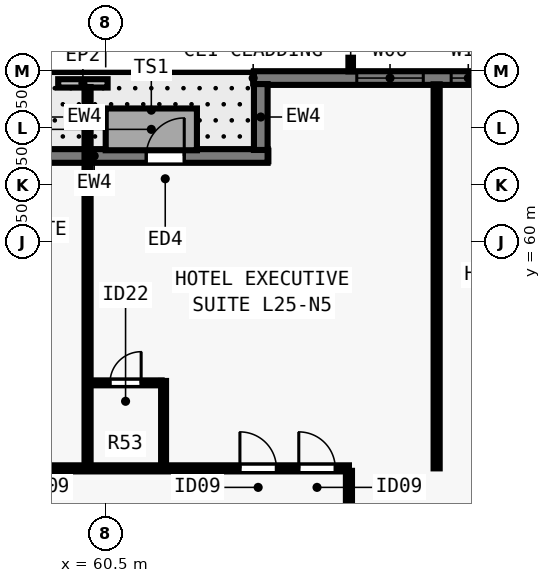
"""IFC4 building model, lengths in metres.
Left out: names, types, materials, properties, quantities, classifications, styles, units other than length and angle.
Written with IfcOpenShell. Run it as: python <this file> out.ifc"""

import sys

from ifc_helpers import new_model, si_unit, direction, frame, frame_2d, origin, place, context, subcontext, project, spatial, rectangle, extrude, element, fill, save


model = new_model("IFC4")
c1 = context("Model", 3, precision=1e-05, world=origin(), true_north=direction((0.0, 1.0)))
c2 = subcontext(c1, "Body", "Model", "MODEL_VIEW")
j1 = project(units=[si_unit("LENGTHUNIT", "METRE"), si_unit("PLANEANGLEUNIT", "RADIAN")], contexts=[c1])
p1 = place(None, origin())
s1 = spatial("IfcSite", under=j1, at=p1, CompositionType="ELEMENT")
p2 = place(p1, origin())
s2 = spatial("IfcBuilding", under=s1, at=p2, CompositionType="ELEMENT")
p3 = place(p2, frame((0.0, 0.0, 93.5)))
s3 = spatial("IfcBuildingStorey", under=s2, at=p3, CompositionType="ELEMENT", Elevation=93.5)
p4 = place(p3, frame((64.4, 64.32, 0.0), z_axis=(0.0, 0.0, 1.0), x_axis=(1.0, 0.0, 0.0)))
e1 = element("IfcWall", 1, at=p4, inside=s3, PredefinedType="SOLIDWALL", context=c2, shape_type="SweptSolid", body=[
    extrude(rectangle(XDim=9.762, YDim=0.36, at=frame_2d((4.881, 0.0))), origin(), (0.0, 0.0, 1.0), 3.24),
])
p5 = place(p4, frame((2.706, 0.0, 0.8)))
e2 = element("IfcOpeningElement", 2, at=p5, cuts=e1, PredefinedType="OPENING", context=c2, shape_type="SweptSolid", body=[
    extrude(rectangle(XDim=1.75, YDim=1.504, at=frame_2d((0.875, 0.752))), frame((0.0, 0.19, 0.0), z_axis=(0.0, -1.0, 0.0), x_axis=(1.0, 0.0, 0.0)), (0.0, 0.0, 1.0), 0.38),
])
p6 = place(p4, frame((5.19, 0.0, 0.8)))
e3 = element("IfcOpeningElement", 3, at=p6, cuts=e1, PredefinedType="OPENING", context=c2, shape_type="SweptSolid", body=[
    extrude(rectangle(XDim=0.9, YDim=1.504, at=frame_2d((0.45, 0.752))), frame((0.0, 0.19, 0.0), z_axis=(0.0, -1.0, 0.0), x_axis=(1.0, 0.0, 0.0)), (0.0, 0.0, 1.0), 0.38),
])
p7 = place(p3, frame((58.978, 62.27, 0.0), z_axis=(0.0, 0.0, 1.0), x_axis=(1.0, 0.0, 0.0)))
e4 = element("IfcWall", 4, at=p7, inside=s3, PredefinedType="SOLIDWALL", context=c2, shape_type="SweptSolid", body=[
    extrude(rectangle(XDim=5.782, YDim=0.36, at=frame_2d((2.891, 0.0))), origin(), (0.0, 0.0, 1.0), 3.24),
])
p8 = place(p7, frame((2.588, 0.0, 0.0)))
e5 = element("IfcOpeningElement", 5, at=p8, cuts=e4, PredefinedType="OPENING", context=c2, shape_type="SweptSolid", body=[
    extrude(rectangle(XDim=1.0, YDim=2.15, at=frame_2d((0.5, 1.075))), frame((0.0, 0.19, 0.0), z_axis=(0.0, -1.0, 0.0), x_axis=(1.0, 0.0, 0.0)), (0.0, 0.0, 1.0), 0.38),
])
p9 = place(p3, frame((64.58, 62.428, 0.0), z_axis=(0.0, 0.0, 1.0), x_axis=(0.0, 1.0, 0.0)))
e6 = element("IfcWall", 6, at=p9, inside=s3, PredefinedType="SOLIDWALL", context=c2, shape_type="SweptSolid", body=[
    extrude(rectangle(XDim=1.734, YDim=0.36, at=frame_2d((0.867, 0.0))), origin(), (0.0, 0.0, 1.0), 3.24),
])
p10 = place(p3, frame((59.25, 64.18, 0.0), z_axis=(0.0, 0.0, 1.0), x_axis=(1.0, 0.0, 0.0)))
e7 = element("IfcWall", 7, at=p10, inside=s3, PredefinedType="PARAPET", context=c2, shape_type="SweptSolid", body=[
    extrude(rectangle(XDim=1.3, YDim=0.22, at=frame_2d((0.65, 0.0))), origin(), (0.0, 0.0, 1.0), 0.55),
])
p11 = place(p3, frame((37.1, 54.05, 0.0), z_axis=(0.0, 0.0, 1.0), x_axis=(1.0, 0.0, 0.0)))
e8 = element("IfcWall", 8, at=p11, inside=s3, PredefinedType="PARTITIONING", context=c2, shape_type="SweptSolid", body=[
    extrude(rectangle(XDim=29.8, YDim=0.16, at=frame_2d((14.9, 0.0))), origin(), (0.0, 0.0, 1.0), 3.24),
])
p12 = place(p11, frame((0.91, 0.0, 0.0)))
e9 = element("IfcOpeningElement", 9, at=p12, cuts=e8, PredefinedType="OPENING", context=c2, shape_type="SweptSolid", body=[
    extrude(rectangle(XDim=0.96, YDim=2.15, at=frame_2d((0.48, 1.075))), frame((0.0, 0.09, 0.0), z_axis=(0.0, -1.0, 0.0), x_axis=(1.0, 0.0, 0.0)), (0.0, 0.0, 1.0), 0.18),
])
p13 = place(p11, frame((3.03, 0.0, 0.0)))
e10 = element("IfcOpeningElement", 10, at=p13, cuts=e8, PredefinedType="OPENING", context=c2, shape_type="SweptSolid", body=[
    extrude(rectangle(XDim=0.96, YDim=2.15, at=frame_2d((0.48, 1.075))), frame((0.0, 0.09, 0.0), z_axis=(0.0, -1.0, 0.0), x_axis=(1.0, 0.0, 0.0)), (0.0, 0.0, 1.0), 0.18),
])
p14 = place(p11, frame((11.39, 0.0, 0.0)))
e11 = element("IfcOpeningElement", 11, at=p14, cuts=e8, PredefinedType="OPENING", context=c2, shape_type="SweptSolid", body=[
    extrude(rectangle(XDim=0.96, YDim=2.15, at=frame_2d((0.48, 1.075))), frame((0.0, 0.09, 0.0), z_axis=(0.0, -1.0, 0.0), x_axis=(1.0, 0.0, 0.0)), (0.0, 0.0, 1.0), 0.18),
])
p15 = place(p11, frame((19.75, 0.0, 0.0)))
e12 = element("IfcOpeningElement", 12, at=p15, cuts=e8, PredefinedType="OPENING", context=c2, shape_type="SweptSolid", body=[
    extrude(rectangle(XDim=0.96, YDim=2.15, at=frame_2d((0.48, 1.075))), frame((0.0, 0.09, 0.0), z_axis=(0.0, -1.0, 0.0), x_axis=(1.0, 0.0, 0.0)), (0.0, 0.0, 1.0), 0.18),
])
p16 = place(p11, frame((26.931, 0.0, 0.0)))
e13 = element("IfcOpeningElement", 13, at=p16, cuts=e8, PredefinedType="OPENING", context=c2, shape_type="SweptSolid", body=[
    extrude(rectangle(XDim=0.96, YDim=2.15, at=frame_2d((0.48, 1.075))), frame((0.0, 0.09, 0.0), z_axis=(0.0, -1.0, 0.0), x_axis=(1.0, 0.0, 0.0)), (0.0, 0.0, 1.0), 0.18),
])
p17 = place(p11, frame((28.48, 0.0, 0.0)))
e14 = element("IfcOpeningElement", 14, at=p17, cuts=e8, PredefinedType="OPENING", context=c2, shape_type="SweptSolid", body=[
    extrude(rectangle(XDim=0.96, YDim=2.15, at=frame_2d((0.48, 1.075))), frame((0.0, 0.09, 0.0), z_axis=(0.0, -1.0, 0.0), x_axis=(1.0, 0.0, 0.0)), (0.0, 0.0, 1.0), 0.18),
])
p18 = place(p3, frame((66.9, 24.015, 0.0), z_axis=(0.0, 0.0, 1.0), x_axis=(0.0, 1.0, 0.0)))
e15 = element("IfcWall", 15, at=p18, inside=s3, PredefinedType="PARTITIONING", context=c2, shape_type="SweptSolid", body=[
    extrude(rectangle(XDim=29.97, YDim=0.16, at=frame_2d((14.985, 0.0))), origin(), (0.0, 0.0, 1.0), 3.24),
])
p19 = place(p18, frame((3.911, 0.0, 0.0)))
e16 = element("IfcOpeningElement", 16, at=p19, cuts=e15, PredefinedType="OPENING", context=c2, shape_type="SweptSolid", body=[
    extrude(rectangle(XDim=0.96, YDim=2.15, at=frame_2d((0.48, 1.075))), frame((0.0, 0.09, 0.0), z_axis=(0.0, -1.0, 0.0), x_axis=(1.0, 0.0, 0.0)), (0.0, 0.0, 1.0), 0.18),
])
p20 = place(p18, frame((9.544, 0.0, 0.0)))
e17 = element("IfcOpeningElement", 17, at=p20, cuts=e15, PredefinedType="OPENING", context=c2, shape_type="SweptSolid", body=[
    extrude(rectangle(XDim=0.96, YDim=2.15, at=frame_2d((0.48, 1.075))), frame((0.0, 0.09, 0.0), z_axis=(0.0, -1.0, 0.0), x_axis=(1.0, 0.0, 0.0)), (0.0, 0.0, 1.0), 0.18),
])
p21 = place(p18, frame((15.625, 0.0, 0.0)))
e18 = element("IfcOpeningElement", 18, at=p21, cuts=e15, PredefinedType="OPENING", context=c2, shape_type="SweptSolid", body=[
    extrude(rectangle(XDim=0.96, YDim=2.15, at=frame_2d((0.48, 1.075))), frame((0.0, 0.09, 0.0), z_axis=(0.0, -1.0, 0.0), x_axis=(1.0, 0.0, 0.0)), (0.0, 0.0, 1.0), 0.18),
])
p22 = place(p18, frame((21.584, 0.0, 0.0)))
e19 = element("IfcOpeningElement", 19, at=p22, cuts=e15, PredefinedType="OPENING", context=c2, shape_type="SweptSolid", body=[
    extrude(rectangle(XDim=0.96, YDim=2.15, at=frame_2d((0.48, 1.075))), frame((0.0, 0.09, 0.0), z_axis=(0.0, -1.0, 0.0), x_axis=(1.0, 0.0, 0.0)), (0.0, 0.0, 1.0), 0.18),
])
p23 = place(p18, frame((27.494, 0.0, 0.0)))
e20 = element("IfcOpeningElement", 20, at=p23, cuts=e15, PredefinedType="OPENING", context=c2, shape_type="SweptSolid", body=[
    extrude(rectangle(XDim=0.96, YDim=2.15, at=frame_2d((0.48, 1.075))), frame((0.0, 0.09, 0.0), z_axis=(0.0, -1.0, 0.0), x_axis=(1.0, 0.0, 0.0)), (0.0, 0.0, 1.0), 0.18),
])
p24 = place(p3, frame((60.022, 54.115, 0.0), z_axis=(0.0, 0.0, 1.0), x_axis=(0.0, 1.0, 0.0)))
e21 = element("IfcWall", 21, at=p24, inside=s3, PredefinedType="PARTITIONING", context=c2, shape_type="SweptSolid", body=[
    extrude(rectangle(XDim=9.97, YDim=0.16, at=frame_2d((4.985, 0.0))), origin(), (0.0, 0.0, 1.0), 3.24),
])
p25 = place(p3, frame((62.022, 54.115, 0.0), z_axis=(0.0, 0.0, 1.0), x_axis=(0.0, 1.0, 0.0)))
e22 = element("IfcWall", 22, at=p25, inside=s3, PredefinedType="PLUMBINGWALL", context=c2, shape_type="SweptSolid", body=[
    extrude(rectangle(XDim=2.235, YDim=0.13, at=frame_2d((1.118, 0.0))), origin(), (0.0, 0.0, 1.0), 3.24),
])
p26 = place(p3, frame((60.087, 56.3, 0.0), z_axis=(0.0, 0.0, 1.0), x_axis=(1.0, 0.0, 0.0)))
e23 = element("IfcWall", 23, at=p26, inside=s3, PredefinedType="PLUMBINGWALL", context=c2, shape_type="SweptSolid", body=[
    extrude(rectangle(XDim=1.885, YDim=0.13, at=frame_2d((0.942, 0.0))), origin(), (0.0, 0.0, 1.0), 3.24),
])
p27 = place(p26, frame((0.525, 0.0, 0.0)))
e24 = element("IfcOpeningElement", 24, at=p27, cuts=e23, PredefinedType="OPENING", context=c2, shape_type="SweptSolid", body=[
    extrude(rectangle(XDim=0.82, YDim=2.1, at=frame_2d((0.41, 1.05))), frame((0.0, 0.075, 0.0), z_axis=(0.0, -1.0, 0.0), x_axis=(1.0, 0.0, 0.0)), (0.0, 0.0, 1.0), 0.15),
])
p28 = place(p3, frame((69.208, 54.05, 0.0), z_axis=(0.0, 0.0, 1.0), x_axis=(0.0, 1.0, 0.0)))
e25 = element("IfcWall", 25, at=p28, inside=s3, PredefinedType="PARTITIONING", context=c2, shape_type="SweptSolid", body=[
    extrude(rectangle(XDim=10.105, YDim=0.16, at=frame_2d((5.052, 0.0))), origin(), (0.0, 0.0, 1.0), 2.399),
])
p29 = place(p5, origin())
e26 = element("IfcWindow", 26, at=p29, inside=s3, PartitioningType="SINGLE_PANEL", PredefinedType="WINDOW", context=c2, shape_type="SweptSolid", body=[
    extrude(rectangle(XDim=1.75, YDim=1.504, at=frame_2d((0.875, 0.752))), frame((0.0, -0.05, 0.0), z_axis=(0.0, -1.0, 0.0), x_axis=(1.0, 0.0, 0.0)), (0.0, 0.0, 1.0), 0.06),
])
fill(e2, e26)
p30 = place(p8, origin())
e27 = element("IfcDoor", 27, at=p30, inside=s3, OperationType="SINGLE_SWING_RIGHT", PredefinedType="DOOR", context=c2, shape_type="SweptSolid", body=[
    extrude(rectangle(XDim=1.0, YDim=2.15, at=frame_2d((0.5, 1.075))), frame((0.0, 0.025, 0.0), z_axis=(0.0, -1.0, 0.0), x_axis=(1.0, 0.0, 0.0)), (0.0, 0.0, 1.0), 0.05),
])
fill(e5, e27)
p31 = place(p6, origin())
e28 = element("IfcWindow", 28, at=p31, inside=s3, PartitioningType="SINGLE_PANEL", PredefinedType="WINDOW", context=c2, shape_type="SweptSolid", body=[
    extrude(rectangle(XDim=0.9, YDim=1.504, at=frame_2d((0.45, 0.752))), frame((0.0, -0.04, 0.0), z_axis=(0.0, -1.0, 0.0), x_axis=(1.0, 0.0, 0.0)), (0.0, 0.0, 1.0), 0.06),
])
fill(e3, e28)
p32 = place(p27, origin())
e29 = element("IfcDoor", 29, at=p32, inside=s3, OperationType="SINGLE_SWING_RIGHT", PredefinedType="DOOR", context=c2, shape_type="SweptSolid", body=[
    extrude(rectangle(XDim=0.82, YDim=2.1, at=frame_2d((0.41, 1.05))), frame((0.0, 0.025, 0.0), z_axis=(0.0, -1.0, 0.0), x_axis=(1.0, 0.0, 0.0)), (0.0, 0.0, 1.0), 0.05),
])
fill(e24, e29)
p33 = place(p16, origin())
e30 = element("IfcDoor", 30, at=p33, inside=s3, OperationType="SINGLE_SWING_LEFT", PredefinedType="DOOR", context=c2, shape_type="SweptSolid", body=[
    extrude(rectangle(XDim=0.96, YDim=2.15, at=frame_2d((0.48, 1.075))), frame((0.0, 0.025, 0.0), z_axis=(0.0, -1.0, 0.0), x_axis=(1.0, 0.0, 0.0)), (0.0, 0.0, 1.0), 0.05),
])
fill(e13, e30)
p34 = place(p17, origin())
e31 = element("IfcDoor", 31, at=p34, inside=s3, OperationType="SINGLE_SWING_LEFT", PredefinedType="DOOR", context=c2, shape_type="SweptSolid", body=[
    extrude(rectangle(XDim=0.96, YDim=2.15, at=frame_2d((0.48, 1.075))), frame((0.0, 0.025, 0.0), z_axis=(0.0, -1.0, 0.0), x_axis=(1.0, 0.0, 0.0)), (0.0, 0.0, 1.0), 0.05),
])
fill(e14, e31)
save(model, sys.argv[1])
